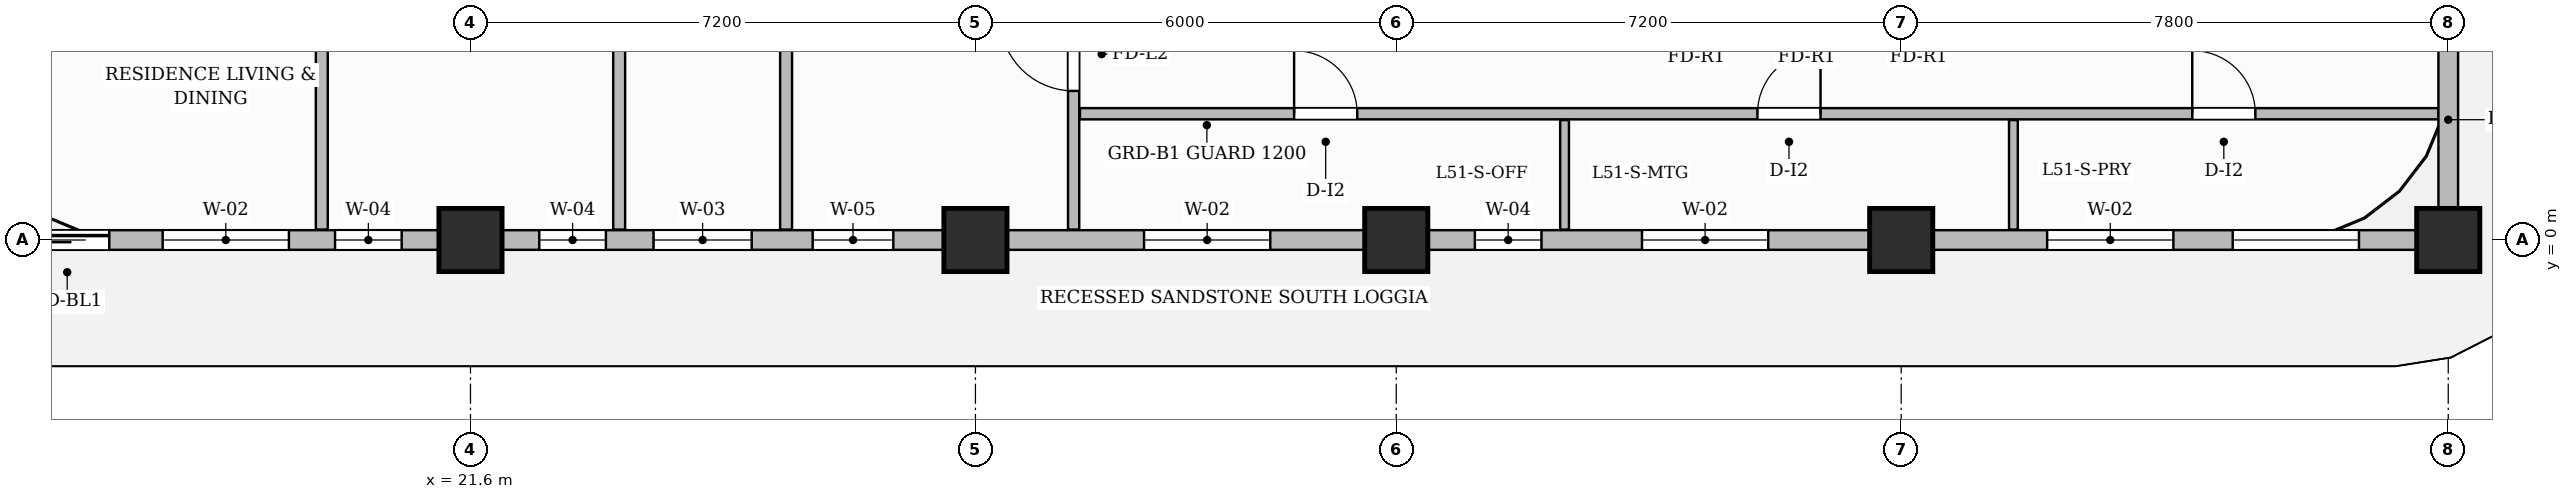
"""IFC4 building model, lengths in metres.
Left out: names, types, materials, properties, quantities, classifications, styles, units other than length and angle.
Written with IfcOpenShell. Run it as: python <this file> out.ifc"""

import sys

from ifc_helpers import new_model, si_unit, direction, frame, frame_2d, origin, origin_2d, place, context, subcontext, project, spatial, rectangle, extrude, source, transform, mapped, element, fill, save


model = new_model("IFC4")
c1 = context("Model", 3, precision=1e-05, world=origin(), true_north=direction((0.0, 1.0)))
c2 = subcontext(c1, "Body", "Model", "MODEL_VIEW")
j1 = project(units=[si_unit("LENGTHUNIT", "METRE"), si_unit("PLANEANGLEUNIT", "RADIAN")], contexts=[c1])
p1 = place(None, origin())
s1 = spatial("IfcSite", under=j1, at=p1, CompositionType="ELEMENT")
p2 = place(p1, origin())
s2 = spatial("IfcBuilding", under=s1, at=p2, CompositionType="ELEMENT")
p3 = place(p2, frame((0.0, 0.0, 205.75)))
s3 = spatial("IfcBuildingStorey", under=s2, at=p3, CompositionType="ELEMENT", Elevation=205.75)
m1 = source(origin(), c2, "Body", "SweptSolid", [
    extrude(rectangle(XDim=0.9, YDim=0.9, at=origin_2d()), origin(), (0.0, 0.0, 1.0), 3.85),
])
for number, where, z_axis, x_axis in (
    (1, (21.6, 0.0, 0.0), (0.0, 0.0, 1.0), (1.0, 0.0, 0.0)),
    (2, (28.8, 0.0, 0.0), (0.0, 0.0, 1.0), (1.0, 0.0, 0.0)),
    (3, (34.8, 0.0, 0.0), (0.0, 0.0, 1.0), (1.0, 0.0, 0.0)),
    (4, (42.0, 0.0, 0.0), (0.0, 0.0, 1.0), (1.0, 0.0, 0.0)),
    (5, (49.8, 0.0, 0.0), (0.0, 0.0, 1.0), (1.0, 0.0, 0.0)),
):
    element("IfcColumn", number, at=place(p3, frame(where, z_axis=z_axis, x_axis=x_axis)), inside=s3, PredefinedType="COLUMN", context=c2, shape_type="MappedRepresentation", body=[
        mapped(m1, transform((0.0, 0.0, 0.0), scale=1.0)),
    ])
p4 = place(p3, frame((30.2, 0.148, 0.0), z_axis=(0.0, 0.0, 1.0), x_axis=(0.0, 1.0, 0.0)))
e6 = element("IfcWall", 6, at=p4, inside=s3, PredefinedType="PARTITIONING", context=c2, shape_type="SweptSolid", body=[
    extrude(rectangle(XDim=9.712, YDim=0.16, at=frame_2d((4.856, 0.0))), origin(), (0.0, 0.0, 1.0), 3.6),
])
p5 = place(p4, frame((1.977, 0.0, 0.0)))
e7 = element("IfcOpeningElement", 7, at=p5, cuts=e6, PredefinedType="OPENING", context=c2, shape_type="SweptSolid", body=[
    extrude(rectangle(XDim=1.05, YDim=2.15, at=frame_2d((0.525, 1.075))), frame((0.0, 0.09, 0.0), z_axis=(0.0, -1.0, 0.0), x_axis=(1.0, 0.0, 0.0)), (0.0, 0.0, 1.0), 0.18),
])
p6 = place(p3, frame((30.29, 1.8, 0.0), z_axis=(0.0, 0.0, 1.0), x_axis=(1.0, 0.0, 0.0)))
e8 = element("IfcWall", 8, at=p6, inside=s3, PredefinedType="PARTITIONING", context=c2, shape_type="SweptSolid", body=[
    extrude(rectangle(XDim=19.37, YDim=0.16, at=frame_2d((9.685, 0.0))), origin(), (0.0, 0.0, 1.0), 3.6),
])
p7 = place(p6, frame((3.054, 0.0, 0.0)))
e9 = element("IfcOpeningElement", 9, at=p7, cuts=e8, PredefinedType="OPENING", context=c2, shape_type="SweptSolid", body=[
    extrude(rectangle(XDim=0.9, YDim=2.15, at=frame_2d((0.45, 1.075))), frame((0.0, 0.09, 0.0), z_axis=(0.0, -1.0, 0.0), x_axis=(1.0, 0.0, 0.0)), (0.0, 0.0, 1.0), 0.18),
])
p8 = place(p6, frame((9.66, 0.0, 0.0)))
e10 = element("IfcOpeningElement", 10, at=p8, cuts=e8, PredefinedType="OPENING", context=c2, shape_type="SweptSolid", body=[
    extrude(rectangle(XDim=0.9, YDim=2.15, at=frame_2d((0.45, 1.075))), frame((0.0, 0.09, 0.0), z_axis=(0.0, -1.0, 0.0), x_axis=(1.0, 0.0, 0.0)), (0.0, 0.0, 1.0), 0.18),
])
p9 = place(p6, frame((15.86, 0.0, 0.0)))
e11 = element("IfcOpeningElement", 11, at=p9, cuts=e8, PredefinedType="OPENING", context=c2, shape_type="SweptSolid", body=[
    extrude(rectangle(XDim=0.9, YDim=2.15, at=frame_2d((0.45, 1.075))), frame((0.0, 0.09, 0.0), z_axis=(0.0, -1.0, 0.0), x_axis=(1.0, 0.0, 0.0)), (0.0, 0.0, 1.0), 0.18),
])
for number, where, z_axis, x_axis in (
    (12, (37.2, 0.148, 0.0), (0.0, 0.0, 1.0), (0.0, 1.0, 0.0)),
    (13, (43.6, 0.148, 0.0), (0.0, 0.0, 1.0), (0.0, 1.0, 0.0)),
):
    element("IfcWall", number, at=place(p3, frame(where, z_axis=z_axis, x_axis=x_axis)), inside=s3, PredefinedType="PARTITIONING", context=c2, shape_type="SweptSolid", body=[
        extrude(rectangle(XDim=1.562, YDim=0.125, at=frame_2d((0.781, 0.0))), origin(), (0.0, 0.0, 1.0), 3.6),
    ])
p10 = place(p3, frame((19.48, 0.148, 0.0), z_axis=(0.0, 0.0, 1.0), x_axis=(0.0, 1.0, 0.0)))
e14 = element("IfcWall", 14, at=p10, inside=s3, PredefinedType="PARTITIONING", context=c2, shape_type="SweptSolid", body=[
    extrude(rectangle(XDim=9.712, YDim=0.17, at=frame_2d((4.856, 0.0))), origin(), (0.0, 0.0, 1.0), 3.6),
])
p11 = place(p10, frame((8.252, 0.0, 0.0)))
e15 = element("IfcOpeningElement", 15, at=p11, cuts=e14, PredefinedType="OPENING", context=c2, shape_type="SweptSolid", body=[
    extrude(rectangle(XDim=0.95, YDim=2.15, at=frame_2d((0.475, 1.075))), frame((0.0, 0.095, 0.0), z_axis=(0.0, -1.0, 0.0), x_axis=(1.0, 0.0, 0.0)), (0.0, 0.0, 1.0), 0.19),
])
for number, where, z_axis, x_axis in (
    (16, (23.72, 0.148, 0.0), (0.0, 0.0, 1.0), (0.0, 1.0, 0.0)),
    (17, (26.1, 0.148, 0.0), (0.0, 0.0, 1.0), (0.0, 1.0, 0.0)),
):
    element("IfcWall", number, at=place(p3, frame(where, z_axis=z_axis, x_axis=x_axis)), inside=s3, PredefinedType="PARTITIONING", context=c2, shape_type="SweptSolid", body=[
        extrude(rectangle(XDim=7.562, YDim=0.17, at=frame_2d((3.781, 0.0))), origin(), (0.0, 0.0, 1.0), 3.6),
    ])
p12 = place(p3, frame((14.4, 0.0, 0.0), z_axis=(0.0, 0.0, 1.0), x_axis=(1.0, 0.0, 0.0)))
e18 = element("IfcWall", 18, at=p12, inside=s3, PredefinedType="SOLIDWALL", context=c2, shape_type="SweptSolid", body=[
    extrude(rectangle(XDim=35.4, YDim=0.28, at=frame_2d((17.7, 0.0))), origin(), (0.0, 0.0, 1.0), 3.085),
])
p13 = place(p12, frame((0.85, 0.0, 0.0)))
e19 = element("IfcOpeningElement", 19, at=p13, cuts=e18, PredefinedType="OPENING", context=c2, shape_type="SweptSolid", body=[
    extrude(rectangle(XDim=1.2, YDim=2.2, at=frame_2d((0.6, 1.1))), frame((0.0, 0.15, 0.0), z_axis=(0.0, -1.0, 0.0), x_axis=(1.0, 0.0, 0.0)), (0.0, 0.0, 1.0), 0.3),
])
p14 = place(p12, frame((2.811, 0.0, 0.8)))
e20 = element("IfcOpeningElement", 20, at=p14, cuts=e18, PredefinedType="OPENING", context=c2, shape_type="SweptSolid", body=[
    extrude(rectangle(XDim=1.8, YDim=1.85, at=frame_2d((0.9, 0.925))), frame((0.0, 0.15, 0.0), z_axis=(0.0, -1.0, 0.0), x_axis=(1.0, 0.0, 0.0)), (0.0, 0.0, 1.0), 0.3),
])
p15 = place(p12, frame((5.269, 0.0, 0.8)))
e21 = element("IfcOpeningElement", 21, at=p15, cuts=e18, PredefinedType="OPENING", context=c2, shape_type="SweptSolid", body=[
    extrude(rectangle(XDim=0.95, YDim=1.75, at=frame_2d((0.475, 0.875))), frame((0.0, 0.15, 0.0), z_axis=(0.0, -1.0, 0.0), x_axis=(1.0, 0.0, 0.0)), (0.0, 0.0, 1.0), 0.3),
])
p16 = place(p12, frame((8.181, 0.0, 0.8)))
e22 = element("IfcOpeningElement", 22, at=p16, cuts=e18, PredefinedType="OPENING", context=c2, shape_type="SweptSolid", body=[
    extrude(rectangle(XDim=0.95, YDim=1.75, at=frame_2d((0.475, 0.875))), frame((0.0, 0.15, 0.0), z_axis=(0.0, -1.0, 0.0), x_axis=(1.0, 0.0, 0.0)), (0.0, 0.0, 1.0), 0.3),
])
p17 = place(p12, frame((9.81, 0.0, 0.8)))
e23 = element("IfcOpeningElement", 23, at=p17, cuts=e18, PredefinedType="OPENING", context=c2, shape_type="SweptSolid", body=[
    extrude(rectangle(XDim=1.4, YDim=1.85, at=frame_2d((0.7, 0.925))), frame((0.0, 0.15, 0.0), z_axis=(0.0, -1.0, 0.0), x_axis=(1.0, 0.0, 0.0)), (0.0, 0.0, 1.0), 0.3),
])
p18 = place(p12, frame((12.079, 0.0, 0.8)))
e24 = element("IfcOpeningElement", 24, at=p18, cuts=e18, PredefinedType="OPENING", context=c2, shape_type="SweptSolid", body=[
    extrude(rectangle(XDim=1.15, YDim=1.8, at=frame_2d((0.575, 0.9))), frame((0.0, 0.15, 0.0), z_axis=(0.0, -1.0, 0.0), x_axis=(1.0, 0.0, 0.0)), (0.0, 0.0, 1.0), 0.3),
])
p19 = place(p12, frame((16.804, 0.0, 0.8)))
e25 = element("IfcOpeningElement", 25, at=p19, cuts=e18, PredefinedType="OPENING", context=c2, shape_type="SweptSolid", body=[
    extrude(rectangle(XDim=1.8, YDim=1.85, at=frame_2d((0.9, 0.925))), frame((0.0, 0.15, 0.0), z_axis=(0.0, -1.0, 0.0), x_axis=(1.0, 0.0, 0.0)), (0.0, 0.0, 1.0), 0.3),
])
p20 = place(p12, frame((21.521, 0.0, 0.8)))
e26 = element("IfcOpeningElement", 26, at=p20, cuts=e18, PredefinedType="OPENING", context=c2, shape_type="SweptSolid", body=[
    extrude(rectangle(XDim=0.95, YDim=1.75, at=frame_2d((0.475, 0.875))), frame((0.0, 0.15, 0.0), z_axis=(0.0, -1.0, 0.0), x_axis=(1.0, 0.0, 0.0)), (0.0, 0.0, 1.0), 0.3),
])
p21 = place(p12, frame((23.904, 0.0, 0.8)))
e27 = element("IfcOpeningElement", 27, at=p21, cuts=e18, PredefinedType="OPENING", context=c2, shape_type="SweptSolid", body=[
    extrude(rectangle(XDim=1.8, YDim=1.85, at=frame_2d((0.9, 0.925))), frame((0.0, 0.15, 0.0), z_axis=(0.0, -1.0, 0.0), x_axis=(1.0, 0.0, 0.0)), (0.0, 0.0, 1.0), 0.3),
])
p22 = place(p12, frame((29.681, 0.0, 0.8)))
e28 = element("IfcOpeningElement", 28, at=p22, cuts=e18, PredefinedType="OPENING", context=c2, shape_type="SweptSolid", body=[
    extrude(rectangle(XDim=1.8, YDim=1.85, at=frame_2d((0.9, 0.925))), frame((0.0, 0.15, 0.0), z_axis=(0.0, -1.0, 0.0), x_axis=(1.0, 0.0, 0.0)), (0.0, 0.0, 1.0), 0.3),
])
p23 = place(p12, frame((32.327, 0.0, 0.8)))
e29 = element("IfcOpeningElement", 29, at=p23, cuts=e18, PredefinedType="OPENING", context=c2, shape_type="SweptSolid", body=[
    extrude(rectangle(XDim=1.8, YDim=1.85, at=frame_2d((0.9, 0.925))), frame((0.0, 0.15, 0.0), z_axis=(0.0, -1.0, 0.0), x_axis=(1.0, 0.0, 0.0)), (0.0, 0.0, 1.0), 0.3),
])
p24 = place(p3, frame((49.8, 0.05, 0.0), z_axis=(0.0, 0.0, 1.0), x_axis=(0.0, 1.0, 0.0)))
e30 = element("IfcWall", 30, at=p24, inside=s3, PredefinedType="SOLIDWALL", context=c2, shape_type="SweptSolid", body=[
    extrude(rectangle(XDim=3.33, YDim=0.28, at=frame_2d((1.665, 0.0))), origin(), (0.0, 0.0, 1.0), 3.6),
])
m2 = source(origin(), c2, "Body", "SweptSolid", [
    extrude(rectangle(XDim=1.05, YDim=2.15, at=frame_2d((0.525, 1.075))), frame((0.0, 0.025, 0.0), z_axis=(0.0, -1.0, 0.0), x_axis=(1.0, 0.0, 0.0)), (0.0, 0.0, 1.0), 0.05),
])
p25 = place(p5, origin())
e31 = element("IfcDoor", 31, at=p25, inside=s3, OperationType="SINGLE_SWING_RIGHT", PredefinedType="DOOR", context=c2, shape_type="MappedRepresentation", body=[
    mapped(m2, transform((0.0, 0.0, 0.0), scale=1.0)),
])
fill(e7, e31)
m3 = source(origin(), c2, "Body", "SweptSolid", [
    extrude(rectangle(XDim=0.9, YDim=2.15, at=frame_2d((0.45, 1.075))), frame((0.0, 0.025, 0.0), z_axis=(0.0, -1.0, 0.0), x_axis=(1.0, 0.0, 0.0)), (0.0, 0.0, 1.0), 0.05),
])
p26 = place(p7, origin())
e32 = element("IfcDoor", 32, at=p26, inside=s3, OperationType="SINGLE_SWING_LEFT", PredefinedType="DOOR", context=c2, shape_type="MappedRepresentation", body=[
    mapped(m3, transform((0.0, 0.0, 0.0), scale=1.0)),
])
fill(e9, e32)
p27 = place(p8, origin())
e33 = element("IfcDoor", 33, at=p27, inside=s3, OperationType="SINGLE_SWING_RIGHT", PredefinedType="DOOR", context=c2, shape_type="MappedRepresentation", body=[
    mapped(m3, transform((0.0, 0.0, 0.0), scale=1.0)),
])
fill(e10, e33)
p28 = place(p9, origin())
e34 = element("IfcDoor", 34, at=p28, inside=s3, OperationType="SINGLE_SWING_LEFT", PredefinedType="DOOR", context=c2, shape_type="MappedRepresentation", body=[
    mapped(m3, transform((0.0, 0.0, 0.0), scale=1.0)),
])
fill(e11, e34)
m4 = source(origin(), c2, "Body", "SweptSolid", [
    extrude(rectangle(XDim=1.2, YDim=2.2, at=frame_2d((0.6, 1.1))), frame((0.0, 0.025, 0.0), z_axis=(0.0, -1.0, 0.0), x_axis=(1.0, 0.0, 0.0)), (0.0, 0.0, 1.0), 0.05),
])
p29 = place(p13, origin())
e35 = element("IfcDoor", 35, at=p29, inside=s3, OperationType="SLIDING_TO_LEFT", PredefinedType="DOOR", context=c2, shape_type="MappedRepresentation", body=[
    mapped(m4, transform((0.0, 0.0, 0.0), scale=1.0)),
])
fill(e19, e35)
m5 = source(origin(), c2, "Body", "SweptSolid", [
    extrude(rectangle(XDim=1.8, YDim=1.85, at=frame_2d((0.9, 0.925))), frame((0.0, 0.03, 0.0), z_axis=(0.0, -1.0, 0.0), x_axis=(1.0, 0.0, 0.0)), (0.0, 0.0, 1.0), 0.06),
])
p30 = place(p14, origin())
e36 = element("IfcWindow", 36, at=p30, inside=s3, PartitioningType="DOUBLE_PANEL_VERTICAL", PredefinedType="WINDOW", context=c2, shape_type="MappedRepresentation", body=[
    mapped(m5, transform((0.0, 0.0, 0.0), scale=1.0)),
])
fill(e20, e36)
m6 = source(origin(), c2, "Body", "SweptSolid", [
    extrude(rectangle(XDim=0.95, YDim=1.75, at=frame_2d((0.475, 0.875))), frame((0.0, 0.03, 0.0), z_axis=(0.0, -1.0, 0.0), x_axis=(1.0, 0.0, 0.0)), (0.0, 0.0, 1.0), 0.06),
])
p31 = place(p15, origin())
e37 = element("IfcWindow", 37, at=p31, inside=s3, PartitioningType="SINGLE_PANEL", PredefinedType="WINDOW", context=c2, shape_type="MappedRepresentation", body=[
    mapped(m6, transform((0.0, 0.0, 0.0), scale=1.0)),
])
fill(e21, e37)
p32 = place(p16, origin())
e38 = element("IfcWindow", 38, at=p32, inside=s3, PartitioningType="SINGLE_PANEL", PredefinedType="WINDOW", context=c2, shape_type="MappedRepresentation", body=[
    mapped(m6, transform((0.0, 0.0, 0.0), scale=1.0)),
])
fill(e22, e38)
m7 = source(origin(), c2, "Body", "SweptSolid", [
    extrude(rectangle(XDim=1.4, YDim=1.85, at=frame_2d((0.7, 0.925))), frame((0.0, 0.03, 0.0), z_axis=(0.0, -1.0, 0.0), x_axis=(1.0, 0.0, 0.0)), (0.0, 0.0, 1.0), 0.06),
])
p33 = place(p17, origin())
e39 = element("IfcWindow", 39, at=p33, inside=s3, PartitioningType="SINGLE_PANEL", PredefinedType="WINDOW", context=c2, shape_type="MappedRepresentation", body=[
    mapped(m7, transform((0.0, 0.0, 0.0), scale=1.0)),
])
fill(e23, e39)
m8 = source(origin(), c2, "Body", "SweptSolid", [
    extrude(rectangle(XDim=1.15, YDim=1.8, at=frame_2d((0.575, 0.9))), frame((0.0, 0.03, 0.0), z_axis=(0.0, -1.0, 0.0), x_axis=(1.0, 0.0, 0.0)), (0.0, 0.0, 1.0), 0.06),
])
p34 = place(p18, origin())
e40 = element("IfcWindow", 40, at=p34, inside=s3, PartitioningType="SINGLE_PANEL", PredefinedType="WINDOW", context=c2, shape_type="MappedRepresentation", body=[
    mapped(m8, transform((0.0, 0.0, 0.0), scale=1.0)),
])
fill(e24, e40)
p35 = place(p19, origin())
e41 = element("IfcWindow", 41, at=p35, inside=s3, PartitioningType="DOUBLE_PANEL_VERTICAL", PredefinedType="WINDOW", context=c2, shape_type="MappedRepresentation", body=[
    mapped(m5, transform((0.0, 0.0, 0.0), scale=1.0)),
])
fill(e25, e41)
p36 = place(p20, origin())
e42 = element("IfcWindow", 42, at=p36, inside=s3, PartitioningType="SINGLE_PANEL", PredefinedType="WINDOW", context=c2, shape_type="MappedRepresentation", body=[
    mapped(m6, transform((0.0, 0.0, 0.0), scale=1.0)),
])
fill(e26, e42)
p37 = place(p21, origin())
e43 = element("IfcWindow", 43, at=p37, inside=s3, PartitioningType="DOUBLE_PANEL_VERTICAL", PredefinedType="WINDOW", context=c2, shape_type="MappedRepresentation", body=[
    mapped(m5, transform((0.0, 0.0, 0.0), scale=1.0)),
])
fill(e27, e43)
p38 = place(p22, origin())
e44 = element("IfcWindow", 44, at=p38, inside=s3, PartitioningType="DOUBLE_PANEL_VERTICAL", PredefinedType="WINDOW", context=c2, shape_type="MappedRepresentation", body=[
    mapped(m5, transform((0.0, 0.0, 0.0), scale=1.0)),
])
fill(e28, e44)
p39 = place(p23, origin())
e45 = element("IfcWindow", 45, at=p39, inside=s3, PartitioningType="DOUBLE_PANEL_VERTICAL", PredefinedType="WINDOW", context=c2, shape_type="MappedRepresentation", body=[
    mapped(m5, transform((0.0, 0.0, 0.0), scale=1.0)),
])
fill(e29, e45)
save(model, sys.argv[1])
